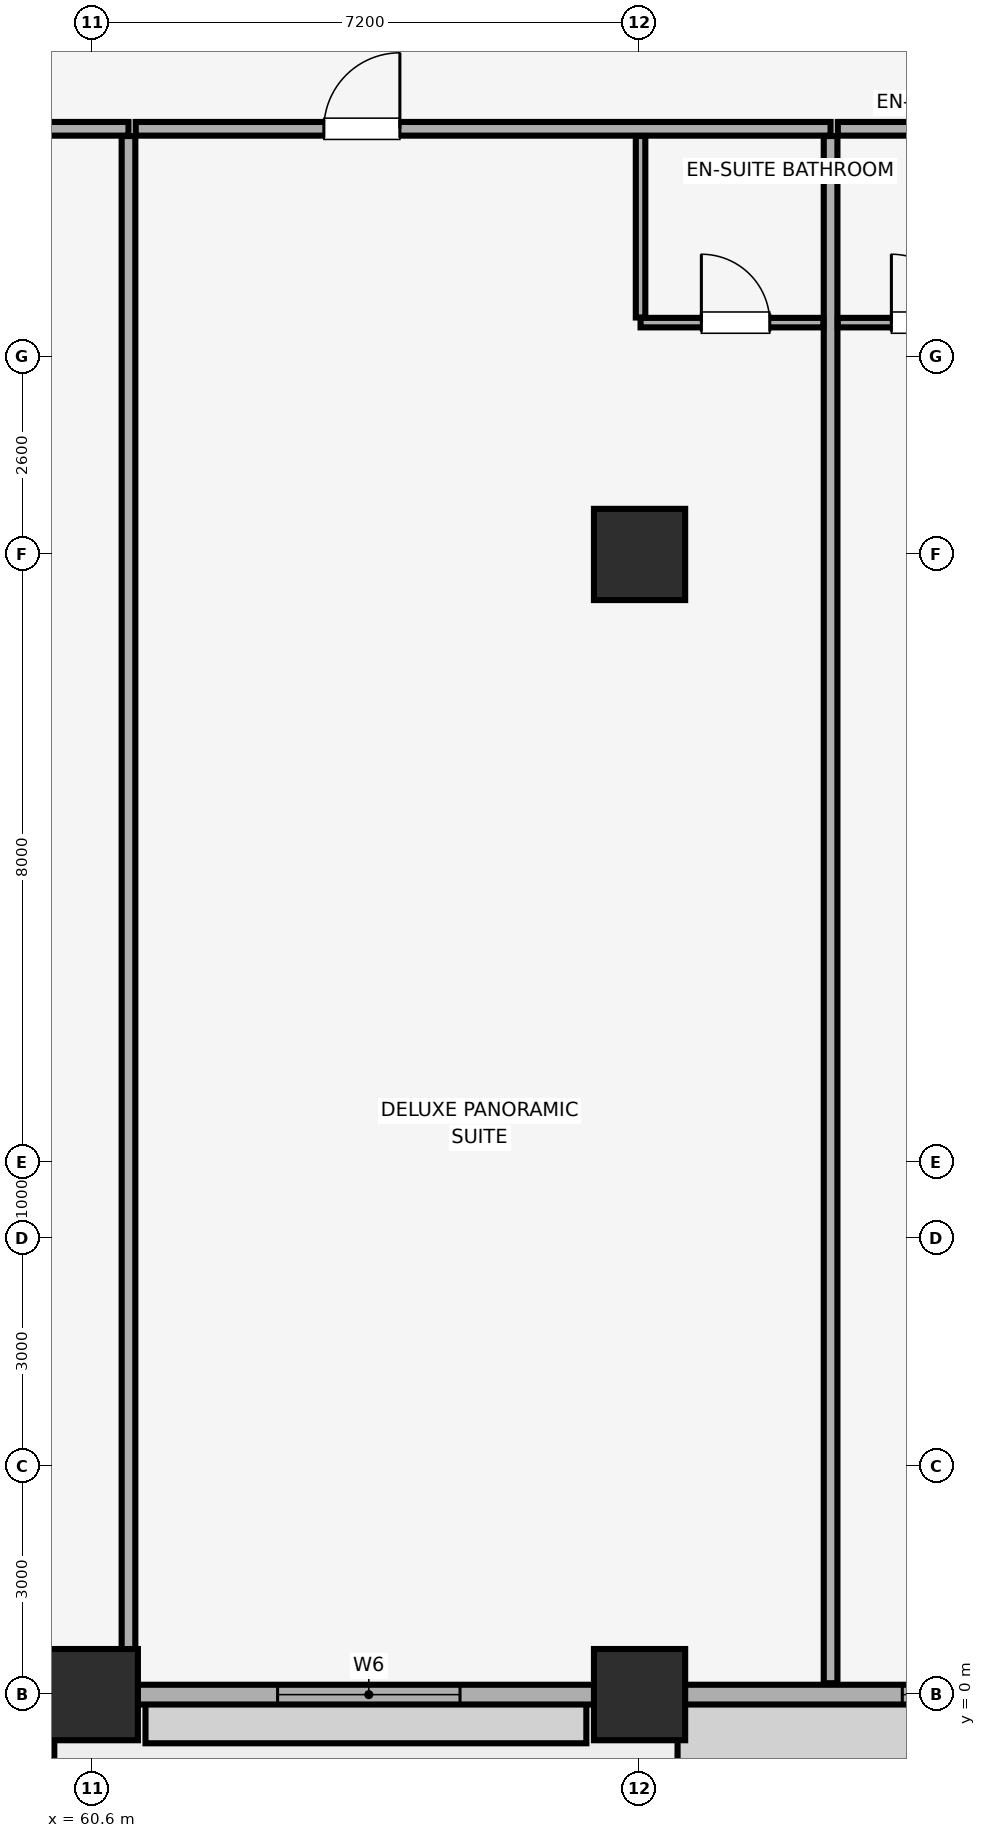
"""IFC4 building model, lengths in metres.
Left out: names, types, materials, properties, quantities, classifications, styles, units other than length and angle.
Written with IfcOpenShell. Run it as: python <this file> out.ifc"""

import sys

from ifc_helpers import new_model, si_unit, direction, frame, frame_2d, origin, origin_2d, place, context, subcontext, project, spatial, rectangle, extrude, element, fill, save


model = new_model("IFC4")
c1 = context("Model", 3, precision=1e-05, world=origin(), true_north=direction((0.0, 1.0)))
c2 = subcontext(c1, "Body", "Model", "MODEL_VIEW")
j1 = project(units=[si_unit("LENGTHUNIT", "METRE"), si_unit("PLANEANGLEUNIT", "RADIAN")], contexts=[c1])
p1 = place(None, origin())
s1 = spatial("IfcSite", under=j1, at=p1, CompositionType="ELEMENT")
p2 = place(p1, origin())
s2 = spatial("IfcBuilding", under=s1, at=p2, CompositionType="ELEMENT")
p3 = place(p2, frame((0.0, 0.0, 93.05)))
s3 = spatial("IfcBuildingStorey", under=s2, at=p3, CompositionType="ELEMENT", Elevation=93.05)
for number, where, z_axis, x_axis in (
    (1, (60.6, 0.0, 0.0), (0.0, 0.0, 1.0), (1.0, 0.0, 0.0)),
    (2, (67.8, 0.0, 0.0), (0.0, 0.0, 1.0), (1.0, 0.0, 0.0)),
    (3, (67.8, 15.0, 0.0), (0.0, 0.0, 1.0), (1.0, 0.0, 0.0)),
):
    element("IfcColumn", number, at=place(p3, frame(where, z_axis=z_axis, x_axis=x_axis)), inside=s3, PredefinedType="COLUMN", context=c2, shape_type="SweptSolid", body=[
        extrude(rectangle(XDim=1.2, YDim=1.2, at=origin_2d()), origin(), (0.0, 0.0, 1.0), 3.51),
    ])
p4 = place(p3, frame((4.2, 0.0, 0.0), z_axis=(0.0, 0.0, 1.0), x_axis=(1.0, 0.0, 0.0)))
e4 = element("IfcWall", 4, at=p4, inside=s3, PredefinedType="SOLIDWALL", context=c2, shape_type="SweptSolid", body=[
    extrude(rectangle(XDim=75.6, YDim=0.26, at=frame_2d((37.8, 0.0))), origin(), (0.0, 0.0, 1.0), 2.56),
])
p5 = place(p4, frame((21.383, 0.0, 0.0)))
e5 = element("IfcOpeningElement", 5, at=p5, cuts=e4, PredefinedType="OPENING", context=c2, shape_type="SweptSolid", body=[
    extrude(rectangle(XDim=1.1, YDim=2.15, at=frame_2d((0.55, 1.075))), frame((0.0, 0.14, 0.0), z_axis=(0.0, -1.0, 0.0), x_axis=(1.0, 0.0, 0.0)), (0.0, 0.0, 1.0), 0.28),
])
p6 = place(p4, frame((36.05, 0.0, 0.0)))
e6 = element("IfcOpeningElement", 6, at=p6, cuts=e4, PredefinedType="OPENING", context=c2, shape_type="SweptSolid", body=[
    extrude(rectangle(XDim=1.1, YDim=2.15, at=frame_2d((0.55, 1.075))), frame((0.0, 0.14, 0.0), z_axis=(0.0, -1.0, 0.0), x_axis=(1.0, 0.0, 0.0)), (0.0, 0.0, 1.0), 0.28),
])
p7 = place(p4, frame((53.117, 0.0, 0.0)))
e7 = element("IfcOpeningElement", 7, at=p7, cuts=e4, PredefinedType="OPENING", context=c2, shape_type="SweptSolid", body=[
    extrude(rectangle(XDim=1.1, YDim=2.15, at=frame_2d((0.55, 1.075))), frame((0.0, 0.14, 0.0), z_axis=(0.0, -1.0, 0.0), x_axis=(1.0, 0.0, 0.0)), (0.0, 0.0, 1.0), 0.28),
])
p8 = place(p4, frame((1.035, 0.0, 0.85)))
e8 = element("IfcOpeningElement", 8, at=p8, cuts=e4, PredefinedType="OPENING", context=c2, shape_type="SweptSolid", body=[
    extrude(rectangle(XDim=2.4, YDim=1.5, at=frame_2d((1.2, 0.75))), frame((0.0, 0.14, 0.0), z_axis=(0.0, -1.0, 0.0), x_axis=(1.0, 0.0, 0.0)), (0.0, 0.0, 1.0), 0.28),
])
p9 = place(p4, frame((6.244, 0.0, 0.85)))
e9 = element("IfcOpeningElement", 9, at=p9, cuts=e4, PredefinedType="OPENING", context=c2, shape_type="SweptSolid", body=[
    extrude(rectangle(XDim=2.4, YDim=1.5, at=frame_2d((1.2, 0.75))), frame((0.0, 0.14, 0.0), z_axis=(0.0, -1.0, 0.0), x_axis=(1.0, 0.0, 0.0)), (0.0, 0.0, 1.0), 0.28),
])
p10 = place(p4, frame((14.4, 0.0, 0.85)))
e10 = element("IfcOpeningElement", 10, at=p10, cuts=e4, PredefinedType="OPENING", context=c2, shape_type="SweptSolid", body=[
    extrude(rectangle(XDim=2.4, YDim=1.5, at=frame_2d((1.2, 0.75))), frame((0.0, 0.14, 0.0), z_axis=(0.0, -1.0, 0.0), x_axis=(1.0, 0.0, 0.0)), (0.0, 0.0, 1.0), 0.28),
])
p11 = place(p4, frame((23.127, 0.0, 0.85)))
e11 = element("IfcOpeningElement", 11, at=p11, cuts=e4, PredefinedType="OPENING", context=c2, shape_type="SweptSolid", body=[
    extrude(rectangle(XDim=2.4, YDim=1.5, at=frame_2d((1.2, 0.75))), frame((0.0, 0.14, 0.0), z_axis=(0.0, -1.0, 0.0), x_axis=(1.0, 0.0, 0.0)), (0.0, 0.0, 1.0), 0.28),
])
p12 = place(p4, frame((29.681, 0.0, 0.85)))
e12 = element("IfcOpeningElement", 12, at=p12, cuts=e4, PredefinedType="OPENING", context=c2, shape_type="SweptSolid", body=[
    extrude(rectangle(XDim=2.4, YDim=1.5, at=frame_2d((1.2, 0.75))), frame((0.0, 0.14, 0.0), z_axis=(0.0, -1.0, 0.0), x_axis=(1.0, 0.0, 0.0)), (0.0, 0.0, 1.0), 0.28),
])
p13 = place(p4, frame((38.601, 0.0, 0.85)))
e13 = element("IfcOpeningElement", 13, at=p13, cuts=e4, PredefinedType="OPENING", context=c2, shape_type="SweptSolid", body=[
    extrude(rectangle(XDim=2.4, YDim=1.5, at=frame_2d((1.2, 0.75))), frame((0.0, 0.14, 0.0), z_axis=(0.0, -1.0, 0.0), x_axis=(1.0, 0.0, 0.0)), (0.0, 0.0, 1.0), 0.28),
])
p14 = place(p4, frame((43.719, 0.0, 0.85)))
e14 = element("IfcOpeningElement", 14, at=p14, cuts=e4, PredefinedType="OPENING", context=c2, shape_type="SweptSolid", body=[
    extrude(rectangle(XDim=2.4, YDim=1.5, at=frame_2d((1.2, 0.75))), frame((0.0, 0.14, 0.0), z_axis=(0.0, -1.0, 0.0), x_axis=(1.0, 0.0, 0.0)), (0.0, 0.0, 1.0), 0.28),
])
p15 = place(p4, frame((50.073, 0.0, 0.85)))
e15 = element("IfcOpeningElement", 15, at=p15, cuts=e4, PredefinedType="OPENING", context=c2, shape_type="SweptSolid", body=[
    extrude(rectangle(XDim=2.4, YDim=1.5, at=frame_2d((1.2, 0.75))), frame((0.0, 0.14, 0.0), z_axis=(0.0, -1.0, 0.0), x_axis=(1.0, 0.0, 0.0)), (0.0, 0.0, 1.0), 0.28),
])
p16 = place(p4, frame((58.838, 0.0, 0.85)))
e16 = element("IfcOpeningElement", 16, at=p16, cuts=e4, PredefinedType="OPENING", context=c2, shape_type="SweptSolid", body=[
    extrude(rectangle(XDim=2.4, YDim=1.5, at=frame_2d((1.2, 0.75))), frame((0.0, 0.14, 0.0), z_axis=(0.0, -1.0, 0.0), x_axis=(1.0, 0.0, 0.0)), (0.0, 0.0, 1.0), 0.28),
])
p17 = place(p4, frame((67.056, 0.0, 0.85)))
e17 = element("IfcOpeningElement", 17, at=p17, cuts=e4, PredefinedType="OPENING", context=c2, shape_type="SweptSolid", body=[
    extrude(rectangle(XDim=2.4, YDim=1.5, at=frame_2d((1.2, 0.75))), frame((0.0, 0.14, 0.0), z_axis=(0.0, -1.0, 0.0), x_axis=(1.0, 0.0, 0.0)), (0.0, 0.0, 1.0), 0.28),
])
p18 = place(p4, frame((72.165, 0.0, 0.85)))
e18 = element("IfcOpeningElement", 18, at=p18, cuts=e4, PredefinedType="OPENING", context=c2, shape_type="SweptSolid", body=[
    extrude(rectangle(XDim=2.4, YDim=1.5, at=frame_2d((1.2, 0.75))), frame((0.0, 0.14, 0.0), z_axis=(0.0, -1.0, 0.0), x_axis=(1.0, 0.0, 0.0)), (0.0, 0.0, 1.0), 0.28),
])
p19 = place(p3, frame((51.733, 20.6, 0.0), z_axis=(0.0, 0.0, 1.0), x_axis=(1.0, 0.0, 0.0)))
e19 = element("IfcWall", 19, at=p19, inside=s3, PredefinedType="PARTITIONING", context=c2, shape_type="SweptSolid", body=[
    extrude(rectangle(XDim=9.343, YDim=0.18, at=frame_2d((4.671, 0.0))), origin(), (0.0, 0.0, 1.0), 3.51),
])
p20 = place(p19, frame((5.196, 0.0, 0.0)))
e20 = element("IfcOpeningElement", 20, at=p20, cuts=e19, PredefinedType="OPENING", context=c2, shape_type="SweptSolid", body=[
    extrude(rectangle(XDim=1.0, YDim=2.15, at=frame_2d((0.5, 1.075))), frame((0.0, 0.1, 0.0), z_axis=(0.0, -1.0, 0.0), x_axis=(1.0, 0.0, 0.0)), (0.0, 0.0, 1.0), 0.2),
])
p21 = place(p3, frame((61.076, 0.15, 0.0), z_axis=(0.0, 0.0, 1.0), x_axis=(0.0, 1.0, 0.0)))
e21 = element("IfcWall", 21, at=p21, inside=s3, PredefinedType="PARTITIONING", context=c2, shape_type="SweptSolid", body=[
    extrude(rectangle(XDim=20.355, YDim=0.18, at=frame_2d((10.177, 0.0))), origin(), (0.0, 0.0, 1.0), 3.51),
])
p22 = place(p3, frame((61.171, 20.6, 0.0), z_axis=(0.0, 0.0, 1.0), x_axis=(1.0, 0.0, 0.0)))
e22 = element("IfcWall", 22, at=p22, inside=s3, PredefinedType="PARTITIONING", context=c2, shape_type="SweptSolid", body=[
    extrude(rectangle(XDim=9.142, YDim=0.18, at=frame_2d((4.571, 0.0))), origin(), (0.0, 0.0, 1.0), 3.51),
])
p23 = place(p22, frame((2.475, 0.0, 0.0)))
e23 = element("IfcOpeningElement", 23, at=p23, cuts=e22, PredefinedType="OPENING", context=c2, shape_type="SweptSolid", body=[
    extrude(rectangle(XDim=1.0, YDim=2.15, at=frame_2d((0.5, 1.075))), frame((0.0, 0.1, 0.0), z_axis=(0.0, -1.0, 0.0), x_axis=(1.0, 0.0, 0.0)), (0.0, 0.0, 1.0), 0.2),
])
p24 = place(p3, frame((70.313, 0.15, 0.0), z_axis=(0.0, 0.0, 1.0), x_axis=(0.0, 1.0, 0.0)))
e24 = element("IfcWall", 24, at=p24, inside=s3, PredefinedType="PARTITIONING", context=c2, shape_type="SweptSolid", body=[
    extrude(rectangle(XDim=20.355, YDim=0.18, at=frame_2d((10.177, 0.0))), origin(), (0.0, 0.0, 1.0), 3.51),
])
p25 = place(p3, frame((67.813, 18.05, 0.0), z_axis=(0.0, 0.0, 1.0), x_axis=(1.0, 0.0, 0.0)))
e25 = element("IfcWall", 25, at=p25, inside=s3, PredefinedType="PARTITIONING", context=c2, shape_type="SweptSolid", body=[
    extrude(rectangle(XDim=2.405, YDim=0.125, at=frame_2d((1.203, 0.0))), origin(), (0.0, 0.0, 1.0), 3.51),
])
p26 = place(p25, frame((0.8, 0.0, 0.0)))
e26 = element("IfcOpeningElement", 26, at=p26, cuts=e25, PredefinedType="OPENING", context=c2, shape_type="SweptSolid", body=[
    extrude(rectangle(XDim=0.9, YDim=2.1, at=frame_2d((0.45, 1.05))), frame((0.0, 0.073, 0.0), z_axis=(0.0, -1.0, 0.0), x_axis=(1.0, 0.0, 0.0)), (0.0, 0.0, 1.0), 0.145),
])
p27 = place(p3, frame((67.813, 18.117, 0.0), z_axis=(0.0, 0.0, 1.0), x_axis=(0.0, 1.0, 0.0)))
e27 = element("IfcWall", 27, at=p27, inside=s3, PredefinedType="PARTITIONING", context=c2, shape_type="SweptSolid", body=[
    extrude(rectangle(XDim=2.387, YDim=0.125, at=frame_2d((1.194, 0.0))), origin(), (0.0, 0.0, 1.0), 2.977),
])
p28 = place(p3, frame((70.408, 20.6, 0.0), z_axis=(0.0, 0.0, 1.0), x_axis=(1.0, 0.0, 0.0)))
e28 = element("IfcWall", 28, at=p28, inside=s3, PredefinedType="PARTITIONING", context=c2, shape_type="SweptSolid", body=[
    extrude(rectangle(XDim=13.442, YDim=0.18, at=frame_2d((6.721, 0.0))), origin(), (0.0, 0.0, 1.0), 3.51),
])
p29 = place(p28, frame((6.757, 0.0, 0.0)))
e29 = element("IfcOpeningElement", 29, at=p29, cuts=e28, PredefinedType="OPENING", context=c2, shape_type="SweptSolid", body=[
    extrude(rectangle(XDim=1.0, YDim=2.15, at=frame_2d((0.5, 1.075))), frame((0.0, 0.1, 0.0), z_axis=(0.0, -1.0, 0.0), x_axis=(1.0, 0.0, 0.0)), (0.0, 0.0, 1.0), 0.2),
])
p30 = place(p3, frame((70.408, 18.05, 0.0), z_axis=(0.0, 0.0, 1.0), x_axis=(1.0, 0.0, 0.0)))
e30 = element("IfcWall", 30, at=p30, inside=s3, PredefinedType="PARTITIONING", context=c2, shape_type="SweptSolid", body=[
    extrude(rectangle(XDim=2.405, YDim=0.125, at=frame_2d((1.202, 0.0))), origin(), (0.0, 0.0, 1.0), 3.51),
])
p31 = place(p30, frame((0.705, 0.0, 0.0)))
e31 = element("IfcOpeningElement", 31, at=p31, cuts=e30, PredefinedType="OPENING", context=c2, shape_type="SweptSolid", body=[
    extrude(rectangle(XDim=0.9, YDim=2.1, at=frame_2d((0.45, 1.05))), frame((0.0, 0.073, 0.0), z_axis=(0.0, -1.0, 0.0), x_axis=(1.0, 0.0, 0.0)), (0.0, 0.0, 1.0), 0.145),
])
p32 = place(p16, origin())
e32 = element("IfcWindow", 32, at=p32, inside=s3, PartitioningType="SINGLE_PANEL", PredefinedType="WINDOW", context=c2, shape_type="SweptSolid", body=[
    extrude(rectangle(XDim=2.4, YDim=1.5, at=frame_2d((1.2, 0.75))), frame((0.0, 0.03, 0.0), z_axis=(0.0, -1.0, 0.0), x_axis=(1.0, 0.0, 0.0)), (0.0, 0.0, 1.0), 0.06),
])
fill(e16, e32)
p33 = place(p17, origin())
e33 = element("IfcWindow", 33, at=p33, inside=s3, PartitioningType="SINGLE_PANEL", PredefinedType="WINDOW", context=c2, shape_type="SweptSolid", body=[
    extrude(rectangle(XDim=2.4, YDim=1.5, at=frame_2d((1.2, 0.75))), frame((0.0, 0.03, 0.0), z_axis=(0.0, -1.0, 0.0), x_axis=(1.0, 0.0, 0.0)), (0.0, 0.0, 1.0), 0.06),
])
fill(e17, e33)
p34 = place(p23, origin())
e34 = element("IfcDoor", 34, at=p34, inside=s3, OperationType="SINGLE_SWING_RIGHT", PredefinedType="DOOR", context=c2, shape_type="SweptSolid", body=[
    extrude(rectangle(XDim=1.0, YDim=2.15, at=frame_2d((0.5, 1.075))), frame((0.0, 0.025, 0.0), z_axis=(0.0, -1.0, 0.0), x_axis=(1.0, 0.0, 0.0)), (0.0, 0.0, 1.0), 0.05),
])
fill(e23, e34)
p35 = place(p26, origin())
e35 = element("IfcDoor", 35, at=p35, inside=s3, OperationType="SINGLE_SWING_LEFT", PredefinedType="DOOR", context=c2, shape_type="SweptSolid", body=[
    extrude(rectangle(XDim=0.9, YDim=2.1, at=frame_2d((0.45, 1.05))), frame((0.0, 0.025, 0.0), z_axis=(0.0, -1.0, 0.0), x_axis=(1.0, 0.0, 0.0)), (0.0, 0.0, 1.0), 0.05),
])
fill(e26, e35)
p36 = place(p31, origin())
e36 = element("IfcDoor", 36, at=p36, inside=s3, OperationType="SINGLE_SWING_LEFT", PredefinedType="DOOR", context=c2, shape_type="SweptSolid", body=[
    extrude(rectangle(XDim=0.9, YDim=2.1, at=frame_2d((0.45, 1.05))), frame((0.0, 0.025, 0.0), z_axis=(0.0, -1.0, 0.0), x_axis=(1.0, 0.0, 0.0)), (0.0, 0.0, 1.0), 0.05),
])
fill(e31, e36)
save(model, sys.argv[1])
